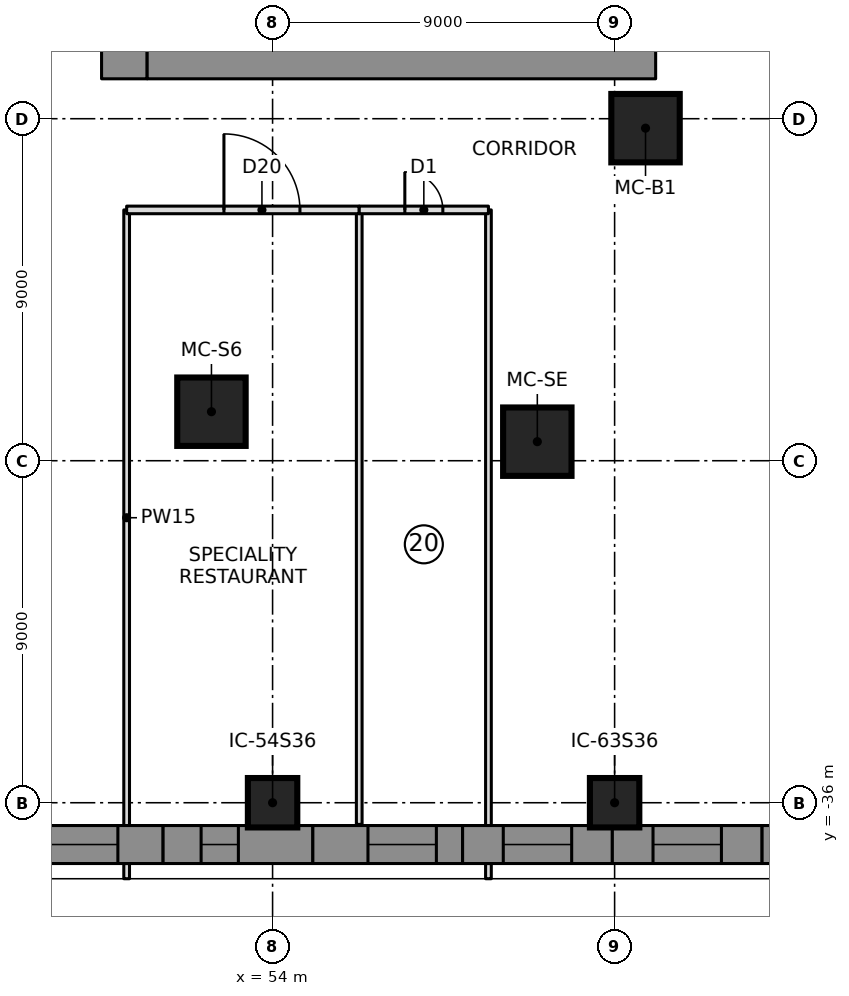
"""IFC4 building model, lengths in metres.
Left out: names, types, materials, properties, quantities, classifications, styles, units other than length and angle.
Written with IfcOpenShell. Run it as: python <this file> out.ifc"""

import sys

from ifc_helpers import new_model, si_unit, direction, frame, frame_2d, origin, origin_2d, place, context, subcontext, project, spatial, polyline, rectangle, outline, extrude, element, fill, save


model = new_model("IFC4")
c1 = context("Model", 3, precision=1e-05, world=origin(), true_north=direction((0.0, 1.0)))
c2 = subcontext(c1, "Body", "Model", "MODEL_VIEW")
j1 = project(units=[si_unit("LENGTHUNIT", "METRE"), si_unit("PLANEANGLEUNIT", "RADIAN")], contexts=[c1])
p1 = place(None, origin())
s1 = spatial("IfcSite", under=j1, at=p1, CompositionType="ELEMENT")
p2 = place(p1, origin())
s2 = spatial("IfcBuilding", under=s1, at=p2, CompositionType="ELEMENT")
p3 = place(p2, frame((0.0, 0.0, 13.5)))
s3 = spatial("IfcBuildingStorey", under=s2, at=p3, CompositionType="ELEMENT", Elevation=13.5)
p4 = place(p3, frame((50.1, -16.95, 0.0), z_axis=(0.0, 0.0, 1.0), x_axis=(0.0, 1.0, 0.0)))
e1 = element("IfcWall", 1, at=p4, inside=s3, PredefinedType="SHEAR", context=c2, shape_type="SweptSolid", body=[
    extrude(rectangle(XDim=10.3, YDim=1.2, at=frame_2d((5.15, 0.0))), origin(), (0.0, 0.0, 1.0), 5.5),
])
p5 = place(p4, frame((2.7, 0.0, 0.0)))
e2 = element("IfcOpeningElement", 2, at=p5, cuts=e1, PredefinedType="OPENING", context=c2, shape_type="SweptSolid", body=[
    extrude(rectangle(XDim=1.1, YDim=2.1, at=frame_2d((0.55, 1.05))), frame((0.0, 0.61, 0.0), z_axis=(0.0, -1.0, 0.0), x_axis=(1.0, 0.0, 0.0)), (0.0, 0.0, 1.0), 1.22),
])
p6 = place(p3, frame((50.7, -16.35, 0.0), z_axis=(0.0, 0.0, 1.0), x_axis=(1.0, 0.0, 0.0)))
e3 = element("IfcWall", 3, at=p6, inside=s3, PredefinedType="SHEAR", context=c2, shape_type="SweptSolid", body=[
    extrude(rectangle(XDim=13.38, YDim=1.2, at=frame_2d((6.69, 0.0))), origin(), (0.0, 0.0, 1.0), 5.5),
])
for number, where, z_axis, x_axis in (
    (4, (52.392, -25.71, 0.0), (0.0, 0.0, 1.0), (1.0, 0.0, 0.0)),
    (5, (60.966, -26.499, 0.0), (0.0, 0.0, 1.0), (1.0, 0.0, 0.0)),
    (6, (63.813, -18.249, 0.0), (0.0, 0.0, 1.0), (1.0, 0.0, 0.0)),
):
    element("IfcColumn", number, at=place(p3, frame(where, z_axis=z_axis, x_axis=x_axis)), inside=s3, PredefinedType="COLUMN", context=c2, shape_type="SweptSolid", body=[
        extrude(rectangle(XDim=1.8, YDim=1.8, at=origin_2d()), origin(), (0.0, 0.0, 1.0), 5.5),
    ])
for number, where, z_axis, x_axis in (
    (7, (54.0, -36.0, 0.0), (0.0, 0.0, 1.0), (1.0, 0.0, 0.0)),
    (8, (63.0, -36.0, 0.0), (0.0, 0.0, 1.0), (1.0, 0.0, 0.0)),
):
    element("IfcColumn", number, at=place(p3, frame(where, z_axis=z_axis, x_axis=x_axis)), inside=s3, PredefinedType="COLUMN", context=c2, shape_type="SweptSolid", body=[
        extrude(rectangle(XDim=1.3, YDim=1.3, at=origin_2d()), origin(), (0.0, 0.0, 1.0), 5.5),
    ])
p7 = place(p3, frame((47.179, -37.1, 0.0), z_axis=(0.0, 0.0, 1.0), x_axis=(1.0, 0.0, 0.0)))
e9 = element("IfcWall", 9, at=p7, inside=s3, PredefinedType="NOTDEFINED", context=c2, shape_type="SweptSolid", body=[
    extrude(outline(polyline([(-0.1, -0.5), (3.94, -0.5), (3.94, 0.5), (0.1, 0.5), (-0.1, -0.5)])), origin(), (0.0, 0.0, 1.0), 5.2),
])
p8 = place(p7, frame((0.95, 0.0, 0.9)))
e10 = element("IfcOpeningElement", 10, at=p8, cuts=e9, PredefinedType="OPENING", context=c2, shape_type="SweptSolid", body=[
    extrude(rectangle(XDim=1.8, YDim=2.4, at=frame_2d((0.9, 1.2))), frame((0.0, 0.51, 0.0), z_axis=(0.0, -1.0, 0.0), x_axis=(1.0, 0.0, 0.0)), (0.0, 0.0, 1.0), 1.02),
])
p9 = place(p3, frame((51.119, -37.1, 0.0), z_axis=(0.0, 0.0, 1.0), x_axis=(1.0, 0.0, 0.0)))
e11 = element("IfcWall", 11, at=p9, inside=s3, PredefinedType="NOTDEFINED", context=c2, shape_type="SweptSolid", body=[
    extrude(outline(polyline([(0.0, -0.5), (3.94, -0.5), (3.94, 0.5), (0.0, 0.5), (0.0, -0.5)])), origin(), (0.0, 0.0, 1.0), 5.2),
])
p10 = place(p9, frame((1.0, 0.0, 0.9)))
e12 = element("IfcOpeningElement", 12, at=p10, cuts=e11, PredefinedType="OPENING", context=c2, shape_type="SweptSolid", body=[
    extrude(rectangle(XDim=0.981, YDim=2.4, at=frame_2d((0.49, 1.2))), frame((0.0, 0.51, 0.0), z_axis=(0.0, -1.0, 0.0), x_axis=(1.0, 0.0, 0.0)), (0.0, 0.0, 1.0), 1.02),
])
p11 = place(p3, frame((55.06, -37.1, 0.0), z_axis=(0.0, 0.0, 1.0), x_axis=(1.0, 0.0, 0.0)))
e13 = element("IfcWall", 13, at=p11, inside=s3, PredefinedType="NOTDEFINED", context=c2, shape_type="SweptSolid", body=[
    extrude(outline(polyline([(0.0, -0.5), (3.94, -0.5), (3.94, 0.5), (0.0, 0.5), (0.0, -0.5)])), origin(), (0.0, 0.0, 1.0), 5.2),
])
p12 = place(p11, frame((1.45, 0.0, 0.9)))
e14 = element("IfcOpeningElement", 14, at=p12, cuts=e13, PredefinedType="OPENING", context=c2, shape_type="SweptSolid", body=[
    extrude(rectangle(XDim=1.8, YDim=2.4, at=frame_2d((0.9, 1.2))), frame((0.0, 0.51, 0.0), z_axis=(0.0, -1.0, 0.0), x_axis=(1.0, 0.0, 0.0)), (0.0, 0.0, 1.0), 1.02),
])
p13 = place(p3, frame((59.0, -37.1, 0.0), z_axis=(0.0, 0.0, 1.0), x_axis=(1.0, 0.0, 0.0)))
e15 = element("IfcWall", 15, at=p13, inside=s3, PredefinedType="NOTDEFINED", context=c2, shape_type="SweptSolid", body=[
    extrude(outline(polyline([(0.0, -0.5), (3.94, -0.5), (3.94, 0.5), (0.0, 0.5), (0.0, -0.5)])), origin(), (0.0, 0.0, 1.0), 5.2),
])
p14 = place(p13, frame((1.07, 0.0, 0.9)))
e16 = element("IfcOpeningElement", 16, at=p14, cuts=e15, PredefinedType="OPENING", context=c2, shape_type="SweptSolid", body=[
    extrude(rectangle(XDim=1.8, YDim=2.4, at=frame_2d((0.9, 1.2))), frame((0.0, 0.51, 0.0), z_axis=(0.0, -1.0, 0.0), x_axis=(1.0, 0.0, 0.0)), (0.0, 0.0, 1.0), 1.02),
])
p15 = place(p3, frame((62.94, -37.1, 0.0), z_axis=(0.0, 0.0, 1.0), x_axis=(1.0, 0.0, 0.0)))
e17 = element("IfcWall", 17, at=p15, inside=s3, PredefinedType="NOTDEFINED", context=c2, shape_type="SweptSolid", body=[
    extrude(outline(polyline([(0.0, -0.5), (3.94, -0.5), (3.94, 0.5), (0.0, 0.5), (0.0, -0.5)])), origin(), (0.0, 0.0, 1.0), 5.2),
])
p16 = place(p15, frame((1.07, 0.0, 0.9)))
e18 = element("IfcOpeningElement", 18, at=p16, cuts=e17, PredefinedType="OPENING", context=c2, shape_type="SweptSolid", body=[
    extrude(rectangle(XDim=1.8, YDim=2.4, at=frame_2d((0.9, 1.2))), frame((0.0, 0.51, 0.0), z_axis=(0.0, -1.0, 0.0), x_axis=(1.0, 0.0, 0.0)), (0.0, 0.0, 1.0), 1.02),
])
p17 = place(p3, frame((66.881, -37.1, 0.0), z_axis=(0.0, 0.0, 1.0), x_axis=(1.0, 0.0, 0.0)))
e19 = element("IfcWall", 19, at=p17, inside=s3, PredefinedType="NOTDEFINED", context=c2, shape_type="SweptSolid", body=[
    extrude(outline(polyline([(0.0, -0.5), (4.04, -0.5), (3.841, 0.5), (0.0, 0.5), (0.0, -0.5)])), origin(), (0.0, 0.0, 1.0), 5.2),
])
p18 = place(p17, frame((1.07, 0.0, 0.9)))
e20 = element("IfcOpeningElement", 20, at=p18, cuts=e19, PredefinedType="OPENING", context=c2, shape_type="SweptSolid", body=[
    extrude(rectangle(XDim=1.8, YDim=2.4, at=frame_2d((0.9, 1.2))), frame((0.0, 0.51, 0.0), z_axis=(0.0, -1.0, 0.0), x_axis=(1.0, 0.0, 0.0)), (0.0, 0.0, 1.0), 1.02),
])
p19 = place(p3, frame((50.16, -38.0, 0.0), z_axis=(0.0, 0.0, 1.0), x_axis=(0.0, 1.0, 0.0)))
e21 = element("IfcWall", 21, at=p19, inside=s3, PredefinedType="PARTITIONING", context=c2, shape_type="SweptSolid", body=[
    extrude(rectangle(XDim=0.4, YDim=0.15, at=frame_2d((0.2, 0.0))), origin(), (0.0, 0.0, 1.0), 5.15),
])
p20 = place(p3, frame((50.16, -36.6, 0.0), z_axis=(0.0, 0.0, 1.0), x_axis=(0.0, 1.0, 0.0)))
e22 = element("IfcWall", 22, at=p20, inside=s3, PredefinedType="PARTITIONING", context=c2, shape_type="SweptSolid", body=[
    extrude(rectangle(XDim=16.2, YDim=0.15, at=frame_2d((8.1, 0.0))), origin(), (0.0, 0.0, 1.0), 5.15),
])
p21 = place(p3, frame((56.28, -36.57, 0.0), z_axis=(0.0, 0.0, 1.0), x_axis=(0.0, 1.0, 0.0)))
e23 = element("IfcWall", 23, at=p21, inside=s3, PredefinedType="PARTITIONING", context=c2, shape_type="SweptSolid", body=[
    extrude(rectangle(XDim=16.17, YDim=0.15, at=frame_2d((8.085, 0.0))), origin(), (0.0, 0.0, 1.0), 5.15),
])
p22 = place(p3, frame((59.68, -38.0, 0.0), z_axis=(0.0, 0.0, 1.0), x_axis=(0.0, 1.0, 0.0)))
e24 = element("IfcWall", 24, at=p22, inside=s3, PredefinedType="PARTITIONING", context=c2, shape_type="SweptSolid", body=[
    extrude(rectangle(XDim=0.4, YDim=0.15, at=frame_2d((0.2, 0.0))), origin(), (0.0, 0.0, 1.0), 5.15),
])
p23 = place(p3, frame((59.68, -36.6, 0.0), z_axis=(0.0, 0.0, 1.0), x_axis=(0.0, 1.0, 0.0)))
e25 = element("IfcWall", 25, at=p23, inside=s3, PredefinedType="PARTITIONING", context=c2, shape_type="SweptSolid", body=[
    extrude(rectangle(XDim=16.2, YDim=0.15, at=frame_2d((8.1, 0.0))), origin(), (0.0, 0.0, 1.0), 5.15),
])
p24 = place(p3, frame((50.16, -20.4, 0.0), z_axis=(0.0, 0.0, 1.0), x_axis=(1.0, 0.0, 0.0)))
e26 = element("IfcWall", 26, at=p24, inside=s3, PredefinedType="PARTITIONING", context=c2, shape_type="SweptSolid", body=[
    extrude(rectangle(XDim=6.12, YDim=0.2, at=frame_2d((3.06, 0.0))), origin(), (0.0, 0.0, 1.0), 5.15),
])
p25 = place(p24, frame((2.56, 0.0, 0.0)))
e27 = element("IfcOpeningElement", 27, at=p25, cuts=e26, PredefinedType="OPENING", context=c2, shape_type="SweptSolid", body=[
    extrude(rectangle(XDim=2.0, YDim=2.4, at=frame_2d((1.0, 1.2))), frame((0.0, 0.11, 0.0), z_axis=(0.0, -1.0, 0.0), x_axis=(1.0, 0.0, 0.0)), (0.0, 0.0, 1.0), 0.22),
])
p26 = place(p3, frame((56.28, -20.4, 0.0), z_axis=(0.0, 0.0, 1.0), x_axis=(1.0, 0.0, 0.0)))
e28 = element("IfcWall", 28, at=p26, inside=s3, PredefinedType="PARTITIONING", context=c2, shape_type="SweptSolid", body=[
    extrude(rectangle(XDim=3.4, YDim=0.2, at=frame_2d((1.7, 0.0))), origin(), (0.0, 0.0, 1.0), 5.15),
])
p27 = place(p26, frame((1.2, 0.0, 0.0)))
e29 = element("IfcOpeningElement", 29, at=p27, cuts=e28, PredefinedType="OPENING", context=c2, shape_type="SweptSolid", body=[
    extrude(rectangle(XDim=1.0, YDim=2.1, at=frame_2d((0.5, 1.05))), frame((0.0, 0.11, 0.0), z_axis=(0.0, -1.0, 0.0), x_axis=(1.0, 0.0, 0.0)), (0.0, 0.0, 1.0), 0.22),
])
p28 = place(p8, origin())
e30 = element("IfcWindow", 30, at=p28, inside=s3, PartitioningType="SINGLE_PANEL", PredefinedType="WINDOW", context=c2, shape_type="SweptSolid", body=[
    extrude(rectangle(XDim=1.8, YDim=2.4, at=frame_2d((0.9, 1.2))), frame((0.0, 0.5, 0.0), z_axis=(0.0, -1.0, 0.0), x_axis=(1.0, 0.0, 0.0)), (0.0, 0.0, 1.0), 0.06),
])
fill(e10, e30)
p29 = place(p10, origin())
e31 = element("IfcWindow", 31, at=p29, inside=s3, PartitioningType="SINGLE_PANEL", PredefinedType="WINDOW", context=c2, shape_type="SweptSolid", body=[
    extrude(rectangle(XDim=0.981, YDim=2.4, at=frame_2d((0.49, 1.2))), frame((0.0, 0.5, 0.0), z_axis=(0.0, -1.0, 0.0), x_axis=(1.0, 0.0, 0.0)), (0.0, 0.0, 1.0), 0.06),
])
fill(e12, e31)
p30 = place(p12, origin())
e32 = element("IfcWindow", 32, at=p30, inside=s3, PartitioningType="SINGLE_PANEL", PredefinedType="WINDOW", context=c2, shape_type="SweptSolid", body=[
    extrude(rectangle(XDim=1.8, YDim=2.4, at=frame_2d((0.9, 1.2))), frame((0.0, 0.5, 0.0), z_axis=(0.0, -1.0, 0.0), x_axis=(1.0, 0.0, 0.0)), (0.0, 0.0, 1.0), 0.06),
])
fill(e14, e32)
p31 = place(p14, origin())
e33 = element("IfcWindow", 33, at=p31, inside=s3, PartitioningType="SINGLE_PANEL", PredefinedType="WINDOW", context=c2, shape_type="SweptSolid", body=[
    extrude(rectangle(XDim=1.8, YDim=2.4, at=frame_2d((0.9, 1.2))), frame((0.0, 0.5, 0.0), z_axis=(0.0, -1.0, 0.0), x_axis=(1.0, 0.0, 0.0)), (0.0, 0.0, 1.0), 0.06),
])
fill(e16, e33)
p32 = place(p16, origin())
e34 = element("IfcWindow", 34, at=p32, inside=s3, PartitioningType="SINGLE_PANEL", PredefinedType="WINDOW", context=c2, shape_type="SweptSolid", body=[
    extrude(rectangle(XDim=1.8, YDim=2.4, at=frame_2d((0.9, 1.2))), frame((0.0, 0.5, 0.0), z_axis=(0.0, -1.0, 0.0), x_axis=(1.0, 0.0, 0.0)), (0.0, 0.0, 1.0), 0.06),
])
fill(e18, e34)
p33 = place(p25, origin())
e35 = element("IfcDoor", 35, at=p33, inside=s3, OperationType="DOUBLE_DOOR_SINGLE_SWING", PredefinedType="DOOR", context=c2, shape_type="SweptSolid", body=[
    extrude(rectangle(XDim=2.0, YDim=2.4, at=frame_2d((1.0, 1.2))), frame((0.0, 0.025, 0.0), z_axis=(0.0, -1.0, 0.0), x_axis=(1.0, 0.0, 0.0)), (0.0, 0.0, 1.0), 0.05),
])
fill(e27, e35)
p34 = place(p27, origin())
e36 = element("IfcDoor", 36, at=p34, inside=s3, OperationType="SINGLE_SWING_LEFT", PredefinedType="DOOR", context=c2, shape_type="SweptSolid", body=[
    extrude(rectangle(XDim=1.0, YDim=2.1, at=frame_2d((0.5, 1.05))), frame((0.0, 0.025, 0.0), z_axis=(0.0, -1.0, 0.0), x_axis=(1.0, 0.0, 0.0)), (0.0, 0.0, 1.0), 0.05),
])
fill(e29, e36)
save(model, sys.argv[1])
